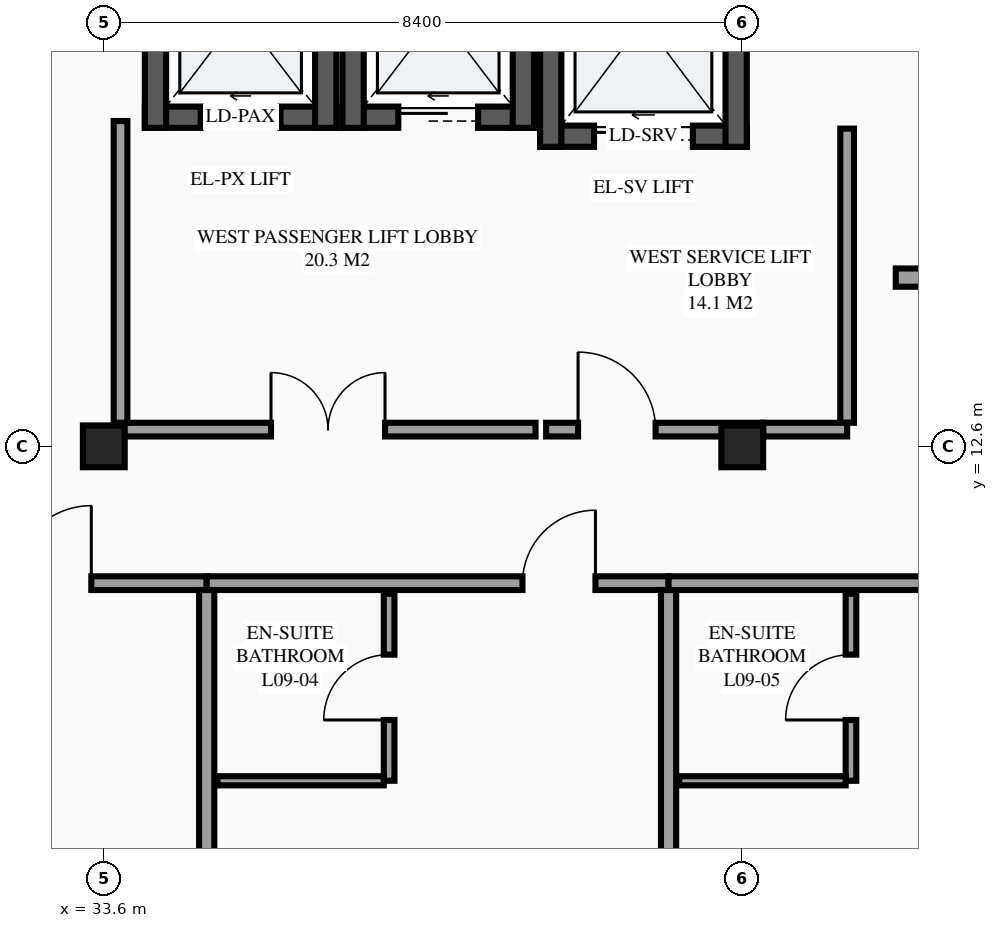
"""IFC4 building model, lengths in metres.
Left out: names, types, materials, properties, quantities, classifications, styles, units other than length and angle.
Written with IfcOpenShell. Run it as: python <this file> out.ifc"""

import sys

from ifc_helpers import new_model, si_unit, direction, frame, frame_2d, origin, origin_2d, place, context, subcontext, project, spatial, rectangle, extrude, element, fill, save


model = new_model("IFC4")
c1 = context("Model", 3, precision=1e-05, world=origin(), true_north=direction((0.0, 1.0)))
c2 = subcontext(c1, "Body", "Model", "MODEL_VIEW")
j1 = project(units=[si_unit("LENGTHUNIT", "METRE"), si_unit("PLANEANGLEUNIT", "RADIAN")], contexts=[c1])
p1 = place(None, origin())
s1 = spatial("IfcSite", under=j1, at=p1, CompositionType="ELEMENT")
p2 = place(p1, origin())
s2 = spatial("IfcBuilding", under=s1, at=p2, CompositionType="ELEMENT")
p3 = place(p2, frame((0.0, 0.0, 36.3)))
s3 = spatial("IfcBuildingStorey", under=s2, at=p3, CompositionType="ELEMENT", Elevation=36.3)
for number, where, z_axis, x_axis in (
    (1, (33.6, 12.6, 0.0), (0.0, 0.0, 1.0), (1.0, 0.0, 0.0)),
    (2, (42.0, 12.6, 0.0), (0.0, 0.0, 1.0), (1.0, 0.0, 0.0)),
):
    element("IfcColumn", number, at=place(p3, frame(where, z_axis=z_axis, x_axis=x_axis)), inside=s3, PredefinedType="COLUMN", context=c2, shape_type="SweptSolid", body=[
        extrude(rectangle(XDim=0.55, YDim=0.55, at=origin_2d()), origin(), (0.0, 0.0, 1.0), 3.6),
    ])
p4 = place(p3, frame((34.14, 16.93, 0.0), z_axis=(0.0, 0.0, 1.0), x_axis=(1.0, 0.0, 0.0)))
e3 = element("IfcWall", 3, at=p4, inside=s3, PredefinedType="SHEAR", context=c2, shape_type="SweptSolid", body=[
    extrude(rectangle(XDim=2.52, YDim=0.28, at=frame_2d((1.26, 0.0))), origin(), (0.0, 0.0, 1.0), 3.6),
])
p5 = place(p4, frame((0.735, 0.0, 0.0)))
e4 = element("IfcOpeningElement", 4, at=p5, cuts=e3, PredefinedType="OPENING", context=c2, shape_type="SweptSolid", body=[
    extrude(rectangle(XDim=1.05, YDim=2.2, at=frame_2d((0.525, 1.1))), frame((0.0, 0.15, 0.0), z_axis=(0.0, -1.0, 0.0), x_axis=(1.0, 0.0, 0.0)), (0.0, 0.0, 1.0), 0.3),
])
for number, where, z_axis, x_axis in (
    (5, (36.52, 16.79, 0.0), (0.0, 0.0, 1.0), (0.0, 1.0, 0.0)),
    (6, (34.28, 19.81, 0.0), (0.0, 0.0, 1.0), (0.0, -1.0, 0.0)),
):
    element("IfcWall", number, at=place(p3, frame(where, z_axis=z_axis, x_axis=x_axis)), inside=s3, PredefinedType="SHEAR", context=c2, shape_type="SweptSolid", body=[
        extrude(rectangle(XDim=3.02, YDim=0.28, at=frame_2d((1.51, 0.0))), origin(), (0.0, 0.0, 1.0), 3.6),
    ])
p6 = place(p3, frame((36.74, 16.93, 0.0), z_axis=(0.0, 0.0, 1.0), x_axis=(1.0, 0.0, 0.0)))
e7 = element("IfcWall", 7, at=p6, inside=s3, PredefinedType="SHEAR", context=c2, shape_type="SweptSolid", body=[
    extrude(rectangle(XDim=2.52, YDim=0.28, at=frame_2d((1.26, 0.0))), origin(), (0.0, 0.0, 1.0), 3.6),
])
p7 = place(p6, frame((0.735, 0.0, 0.0)))
e8 = element("IfcOpeningElement", 8, at=p7, cuts=e7, PredefinedType="OPENING", context=c2, shape_type="SweptSolid", body=[
    extrude(rectangle(XDim=1.05, YDim=2.2, at=frame_2d((0.525, 1.1))), frame((0.0, 0.15, 0.0), z_axis=(0.0, -1.0, 0.0), x_axis=(1.0, 0.0, 0.0)), (0.0, 0.0, 1.0), 0.3),
])
for number, where, z_axis, x_axis in (
    (9, (39.12, 16.79, 0.0), (0.0, 0.0, 1.0), (0.0, 1.0, 0.0)),
    (10, (36.88, 19.81, 0.0), (0.0, 0.0, 1.0), (0.0, -1.0, 0.0)),
):
    element("IfcWall", number, at=place(p3, frame(where, z_axis=z_axis, x_axis=x_axis)), inside=s3, PredefinedType="SHEAR", context=c2, shape_type="SweptSolid", body=[
        extrude(rectangle(XDim=3.02, YDim=0.28, at=frame_2d((1.51, 0.0))), origin(), (0.0, 0.0, 1.0), 3.6),
    ])
p8 = place(p3, frame((39.34, 16.68, 0.0), z_axis=(0.0, 0.0, 1.0), x_axis=(1.0, 0.0, 0.0)))
e11 = element("IfcWall", 11, at=p8, inside=s3, PredefinedType="SHEAR", context=c2, shape_type="SweptSolid", body=[
    extrude(rectangle(XDim=2.72, YDim=0.28, at=frame_2d((1.36, 0.0))), origin(), (0.0, 0.0, 1.0), 3.6),
])
p9 = place(p8, frame((0.71, 0.0, 0.0)))
e12 = element("IfcOpeningElement", 12, at=p9, cuts=e11, PredefinedType="OPENING", context=c2, shape_type="SweptSolid", body=[
    extrude(rectangle(XDim=1.3, YDim=2.25, at=frame_2d((0.65, 1.125))), frame((0.0, 0.15, 0.0), z_axis=(0.0, -1.0, 0.0), x_axis=(1.0, 0.0, 0.0)), (0.0, 0.0, 1.0), 0.3),
])
for number, where, z_axis, x_axis in (
    (13, (41.92, 16.54, 0.0), (0.0, 0.0, 1.0), (0.0, 1.0, 0.0)),
    (14, (39.48, 19.86, 0.0), (0.0, 0.0, 1.0), (0.0, -1.0, 0.0)),
):
    element("IfcWall", number, at=place(p3, frame(where, z_axis=z_axis, x_axis=x_axis)), inside=s3, PredefinedType="SHEAR", context=c2, shape_type="SweptSolid", body=[
        extrude(rectangle(XDim=3.32, YDim=0.28, at=frame_2d((1.66, 0.0))), origin(), (0.0, 0.0, 1.0), 3.6),
    ])
p10 = place(p3, frame((28.877, 10.8, 0.0), z_axis=(0.0, 0.0, 1.0), x_axis=(1.0, 0.0, 0.0)))
e15 = element("IfcWall", 15, at=p10, inside=s3, PredefinedType="PARTITIONING", context=c2, shape_type="SweptSolid", body=[
    extrude(rectangle(XDim=6.077, YDim=0.18, at=frame_2d((3.039, 0.0))), origin(), (0.0, 0.0, 1.0), 3.375),
])
p11 = place(p10, frame((3.539, 0.0, 0.0)))
e16 = element("IfcOpeningElement", 16, at=p11, cuts=e15, PredefinedType="OPENING", context=c2, shape_type="SweptSolid", body=[
    extrude(rectangle(XDim=1.02, YDim=2.15, at=frame_2d((0.51, 1.075))), frame((0.0, 0.1, 0.0), z_axis=(0.0, -1.0, 0.0), x_axis=(1.0, 0.0, 0.0)), (0.0, 0.0, 1.0), 0.2),
])
p12 = place(p3, frame((34.954, 4.36, 0.0), z_axis=(0.0, 0.0, 1.0), x_axis=(0.0, 1.0, 0.0)))
e17 = element("IfcWall", 17, at=p12, inside=s3, PredefinedType="PARTITIONING", context=c2, shape_type="SweptSolid", body=[
    extrude(rectangle(XDim=6.35, YDim=0.2, at=frame_2d((3.175, 0.0))), origin(), (0.0, 0.0, 1.0), 3.375),
])
p13 = place(p3, frame((34.954, 10.8, 0.0), z_axis=(0.0, 0.0, 1.0), x_axis=(1.0, 0.0, 0.0)))
e18 = element("IfcWall", 18, at=p13, inside=s3, PredefinedType="PARTITIONING", context=c2, shape_type="SweptSolid", body=[
    extrude(rectangle(XDim=6.077, YDim=0.18, at=frame_2d((3.039, 0.0))), origin(), (0.0, 0.0, 1.0), 3.375),
])
p14 = place(p13, frame((4.155, 0.0, 0.0)))
e19 = element("IfcOpeningElement", 19, at=p14, cuts=e18, PredefinedType="OPENING", context=c2, shape_type="SweptSolid", body=[
    extrude(rectangle(XDim=0.96, YDim=2.15, at=frame_2d((0.48, 1.075))), frame((0.0, 0.1, 0.0), z_axis=(0.0, -1.0, 0.0), x_axis=(1.0, 0.0, 0.0)), (0.0, 0.0, 1.0), 0.2),
])
p15 = place(p3, frame((41.031, 4.36, 0.0), z_axis=(0.0, 0.0, 1.0), x_axis=(0.0, 1.0, 0.0)))
e20 = element("IfcWall", 20, at=p15, inside=s3, PredefinedType="PARTITIONING", context=c2, shape_type="SweptSolid", body=[
    extrude(rectangle(XDim=6.35, YDim=0.2, at=frame_2d((3.175, 0.0))), origin(), (0.0, 0.0, 1.0), 3.375),
])
p16 = place(p3, frame((37.354, 8.2, 0.0), z_axis=(0.0, 0.0, 1.0), x_axis=(0.0, 1.0, 0.0)))
e21 = element("IfcWall", 21, at=p16, inside=s3, PredefinedType="PARTITIONING", context=c2, shape_type="SweptSolid", body=[
    extrude(rectangle(XDim=2.46, YDim=0.14, at=frame_2d((1.23, 0.0))), origin(), (0.0, 0.0, 1.0), 3.375),
])
p17 = place(p16, frame((0.8, 0.0, 0.0)))
e22 = element("IfcOpeningElement", 22, at=p17, cuts=e21, PredefinedType="OPENING", context=c2, shape_type="SweptSolid", body=[
    extrude(rectangle(XDim=0.86, YDim=2.1, at=frame_2d((0.43, 1.05))), frame((0.0, 0.08, 0.0), z_axis=(0.0, -1.0, 0.0), x_axis=(1.0, 0.0, 0.0)), (0.0, 0.0, 1.0), 0.16),
])
p18 = place(p3, frame((35.094, 8.2, 0.0), z_axis=(0.0, 0.0, 1.0), x_axis=(1.0, 0.0, 0.0)))
e23 = element("IfcWall", 23, at=p18, inside=s3, PredefinedType="PARTITIONING", context=c2, shape_type="SweptSolid", body=[
    extrude(rectangle(XDim=2.19, YDim=0.12, at=frame_2d((1.095, 0.0))), origin(), (0.0, 0.0, 1.0), 3.375),
])
p19 = place(p3, frame((41.031, 10.8, 0.0), z_axis=(0.0, 0.0, 1.0), x_axis=(1.0, 0.0, 0.0)))
e24 = element("IfcWall", 24, at=p19, inside=s3, PredefinedType="PARTITIONING", context=c2, shape_type="SweptSolid", body=[
    extrude(rectangle(XDim=6.077, YDim=0.18, at=frame_2d((3.039, 0.0))), origin(), (0.0, 0.0, 1.0), 3.375),
])
p20 = place(p19, frame((4.155, 0.0, 0.0)))
e25 = element("IfcOpeningElement", 25, at=p20, cuts=e24, PredefinedType="OPENING", context=c2, shape_type="SweptSolid", body=[
    extrude(rectangle(XDim=0.96, YDim=2.15, at=frame_2d((0.48, 1.075))), frame((0.0, 0.1, 0.0), z_axis=(0.0, -1.0, 0.0), x_axis=(1.0, 0.0, 0.0)), (0.0, 0.0, 1.0), 0.2),
])
p21 = place(p3, frame((43.431, 8.2, 0.0), z_axis=(0.0, 0.0, 1.0), x_axis=(0.0, 1.0, 0.0)))
e26 = element("IfcWall", 26, at=p21, inside=s3, PredefinedType="PARTITIONING", context=c2, shape_type="SweptSolid", body=[
    extrude(rectangle(XDim=2.46, YDim=0.14, at=frame_2d((1.23, 0.0))), origin(), (0.0, 0.0, 1.0), 3.375),
])
p22 = place(p21, frame((0.8, 0.0, 0.0)))
e27 = element("IfcOpeningElement", 27, at=p22, cuts=e26, PredefinedType="OPENING", context=c2, shape_type="SweptSolid", body=[
    extrude(rectangle(XDim=0.86, YDim=2.1, at=frame_2d((0.43, 1.05))), frame((0.0, 0.08, 0.0), z_axis=(0.0, -1.0, 0.0), x_axis=(1.0, 0.0, 0.0)), (0.0, 0.0, 1.0), 0.16),
])
p23 = place(p3, frame((41.171, 8.2, 0.0), z_axis=(0.0, 0.0, 1.0), x_axis=(1.0, 0.0, 0.0)))
e28 = element("IfcWall", 28, at=p23, inside=s3, PredefinedType="PARTITIONING", context=c2, shape_type="SweptSolid", body=[
    extrude(rectangle(XDim=2.19, YDim=0.12, at=frame_2d((1.095, 0.0))), origin(), (0.0, 0.0, 1.0), 3.375),
])
p24 = place(p3, frame((33.82, 12.82, 0.0), z_axis=(0.0, 0.0, 1.0), x_axis=(1.0, 0.0, 0.0)))
e29 = element("IfcWall", 29, at=p24, inside=s3, PredefinedType="PARTITIONING", context=c2, shape_type="SweptSolid", body=[
    extrude(rectangle(XDim=5.46, YDim=0.18, at=frame_2d((2.73, 0.0))), origin(), (0.0, 0.0, 1.0), 3.375),
])
p25 = place(p24, frame((1.98, 0.0, 0.0)))
e30 = element("IfcOpeningElement", 30, at=p25, cuts=e29, PredefinedType="OPENING", context=c2, shape_type="SweptSolid", body=[
    extrude(rectangle(XDim=1.5, YDim=2.15, at=frame_2d((0.75, 1.075))), frame((0.0, 0.1, 0.0), z_axis=(0.0, -1.0, 0.0), x_axis=(1.0, 0.0, 0.0)), (0.0, 0.0, 1.0), 0.2),
])
p26 = place(p3, frame((33.82, 12.91, 0.0), z_axis=(0.0, 0.0, 1.0), x_axis=(0.0, 1.0, 0.0)))
e31 = element("IfcWall", 31, at=p26, inside=s3, PredefinedType="PARTITIONING", context=c2, shape_type="SweptSolid", body=[
    extrude(rectangle(XDim=3.97, YDim=0.18, at=frame_2d((1.985, 0.0))), origin(), (0.0, 0.0, 1.0), 2.48),
])
p27 = place(p3, frame((39.42, 12.82, 0.0), z_axis=(0.0, 0.0, 1.0), x_axis=(1.0, 0.0, 0.0)))
e32 = element("IfcWall", 32, at=p27, inside=s3, PredefinedType="PARTITIONING", context=c2, shape_type="SweptSolid", body=[
    extrude(rectangle(XDim=2.855, YDim=0.18, at=frame_2d((1.427, 0.0))), origin(), (0.0, 0.0, 1.0), 3.375),
])
p28 = place(p27, frame((0.42, 0.0, 0.0)))
e33 = element("IfcOpeningElement", 33, at=p28, cuts=e32, PredefinedType="OPENING", context=c2, shape_type="SweptSolid", body=[
    extrude(rectangle(XDim=1.02, YDim=2.15, at=frame_2d((0.51, 1.075))), frame((0.0, 0.1, 0.0), z_axis=(0.0, -1.0, 0.0), x_axis=(1.0, 0.0, 0.0)), (0.0, 0.0, 1.0), 0.2),
])
p29 = place(p3, frame((43.38, 12.91, 0.0), z_axis=(0.0, 0.0, 1.0), x_axis=(0.0, 1.0, 0.0)))
e34 = element("IfcWall", 34, at=p29, inside=s3, PredefinedType="PARTITIONING", context=c2, shape_type="SweptSolid", body=[
    extrude(rectangle(XDim=3.87, YDim=0.18, at=frame_2d((1.935, 0.0))), origin(), (0.0, 0.0, 1.0), 3.375),
])
p30 = place(p3, frame((44.02, 14.82, 0.0), z_axis=(0.0, 0.0, 1.0), x_axis=(1.0, 0.0, 0.0)))
e35 = element("IfcWall", 35, at=p30, inside=s3, PredefinedType="PARTITIONING", context=c2, shape_type="SweptSolid", body=[
    extrude(rectangle(XDim=5.96, YDim=0.24, at=frame_2d((2.98, 0.0))), origin(), (0.0, 0.0, 1.0), 3.375),
])
p31 = place(p30, frame((2.13, 0.0, 0.0)))
e36 = element("IfcOpeningElement", 36, at=p31, cuts=e35, PredefinedType="OPENING", context=c2, shape_type="SweptSolid", body=[
    extrude(rectangle(XDim=1.7, YDim=2.2, at=frame_2d((0.85, 1.1))), frame((0.0, 0.13, 0.0), z_axis=(0.0, -1.0, 0.0), x_axis=(1.0, 0.0, 0.0)), (0.0, 0.0, 1.0), 0.26),
])
p32 = place(p3, frame((42.275, 12.82, 0.0), z_axis=(0.0, 0.0, 1.0), x_axis=(1.0, 0.0, 0.0)))
e37 = element("IfcWall", 37, at=p32, inside=s3, PredefinedType="PARTITIONING", context=c2, shape_type="SweptSolid", body=[
    extrude(rectangle(XDim=1.105, YDim=0.18, at=frame_2d((0.552, 0.0))), origin(), (0.0, 0.0, 1.0), 2.43),
])
p33 = place(p5, origin())
e38 = element("IfcDoor", 38, at=p33, inside=s3, OperationType="SLIDING_TO_LEFT", PredefinedType="DOOR", context=c2, shape_type="SweptSolid", body=[
    extrude(rectangle(XDim=1.05, YDim=2.2, at=frame_2d((0.525, 1.1))), frame((0.0, 0.025, 0.0), z_axis=(0.0, -1.0, 0.0), x_axis=(1.0, 0.0, 0.0)), (0.0, 0.0, 1.0), 0.05),
])
fill(e4, e38)
p34 = place(p7, origin())
e39 = element("IfcDoor", 39, at=p34, inside=s3, OperationType="SLIDING_TO_LEFT", PredefinedType="DOOR", context=c2, shape_type="SweptSolid", body=[
    extrude(rectangle(XDim=1.05, YDim=2.2, at=frame_2d((0.525, 1.1))), frame((0.0, 0.025, 0.0), z_axis=(0.0, -1.0, 0.0), x_axis=(1.0, 0.0, 0.0)), (0.0, 0.0, 1.0), 0.05),
])
fill(e8, e39)
p35 = place(p9, origin())
e40 = element("IfcDoor", 40, at=p35, inside=s3, OperationType="SLIDING_TO_LEFT", PredefinedType="DOOR", context=c2, shape_type="SweptSolid", body=[
    extrude(rectangle(XDim=1.3, YDim=2.25, at=frame_2d((0.65, 1.125))), frame((0.0, 0.025, 0.0), z_axis=(0.0, -1.0, 0.0), x_axis=(1.0, 0.0, 0.0)), (0.0, 0.0, 1.0), 0.05),
])
fill(e12, e40)
p36 = place(p11, origin())
e41 = element("IfcDoor", 41, at=p36, inside=s3, OperationType="SINGLE_SWING_RIGHT", PredefinedType="DOOR", context=c2, shape_type="SweptSolid", body=[
    extrude(rectangle(XDim=1.02, YDim=2.15, at=frame_2d((0.51, 1.075))), frame((0.0, 0.025, 0.0), z_axis=(0.0, -1.0, 0.0), x_axis=(1.0, 0.0, 0.0)), (0.0, 0.0, 1.0), 0.05),
])
fill(e16, e41)
p37 = place(p14, origin())
e42 = element("IfcDoor", 42, at=p37, inside=s3, OperationType="SINGLE_SWING_RIGHT", PredefinedType="DOOR", context=c2, shape_type="SweptSolid", body=[
    extrude(rectangle(XDim=0.96, YDim=2.15, at=frame_2d((0.48, 1.075))), frame((0.0, 0.025, 0.0), z_axis=(0.0, -1.0, 0.0), x_axis=(1.0, 0.0, 0.0)), (0.0, 0.0, 1.0), 0.05),
])
fill(e19, e42)
p38 = place(p17, origin())
e43 = element("IfcDoor", 43, at=p38, inside=s3, OperationType="SINGLE_SWING_LEFT", PredefinedType="DOOR", context=c2, shape_type="SweptSolid", body=[
    extrude(rectangle(XDim=0.86, YDim=2.1, at=frame_2d((0.43, 1.05))), frame((0.0, 0.025, 0.0), z_axis=(0.0, -1.0, 0.0), x_axis=(1.0, 0.0, 0.0)), (0.0, 0.0, 1.0), 0.05),
])
fill(e22, e43)
p39 = place(p22, origin())
e44 = element("IfcDoor", 44, at=p39, inside=s3, OperationType="SINGLE_SWING_LEFT", PredefinedType="DOOR", context=c2, shape_type="SweptSolid", body=[
    extrude(rectangle(XDim=0.86, YDim=2.1, at=frame_2d((0.43, 1.05))), frame((0.0, 0.025, 0.0), z_axis=(0.0, -1.0, 0.0), x_axis=(1.0, 0.0, 0.0)), (0.0, 0.0, 1.0), 0.05),
])
fill(e27, e44)
p40 = place(p25, origin())
e45 = element("IfcDoor", 45, at=p40, inside=s3, OperationType="DOUBLE_DOOR_SINGLE_SWING", PredefinedType="DOOR", context=c2, shape_type="SweptSolid", body=[
    extrude(rectangle(XDim=1.5, YDim=2.15, at=frame_2d((0.75, 1.075))), frame((0.0, 0.025, 0.0), z_axis=(0.0, -1.0, 0.0), x_axis=(1.0, 0.0, 0.0)), (0.0, 0.0, 1.0), 0.05),
])
fill(e30, e45)
p41 = place(p28, origin())
e46 = element("IfcDoor", 46, at=p41, inside=s3, OperationType="SINGLE_SWING_LEFT", PredefinedType="DOOR", context=c2, shape_type="SweptSolid", body=[
    extrude(rectangle(XDim=1.02, YDim=2.15, at=frame_2d((0.51, 1.075))), frame((0.0, 0.025, 0.0), z_axis=(0.0, -1.0, 0.0), x_axis=(1.0, 0.0, 0.0)), (0.0, 0.0, 1.0), 0.05),
])
fill(e33, e46)
save(model, sys.argv[1])
